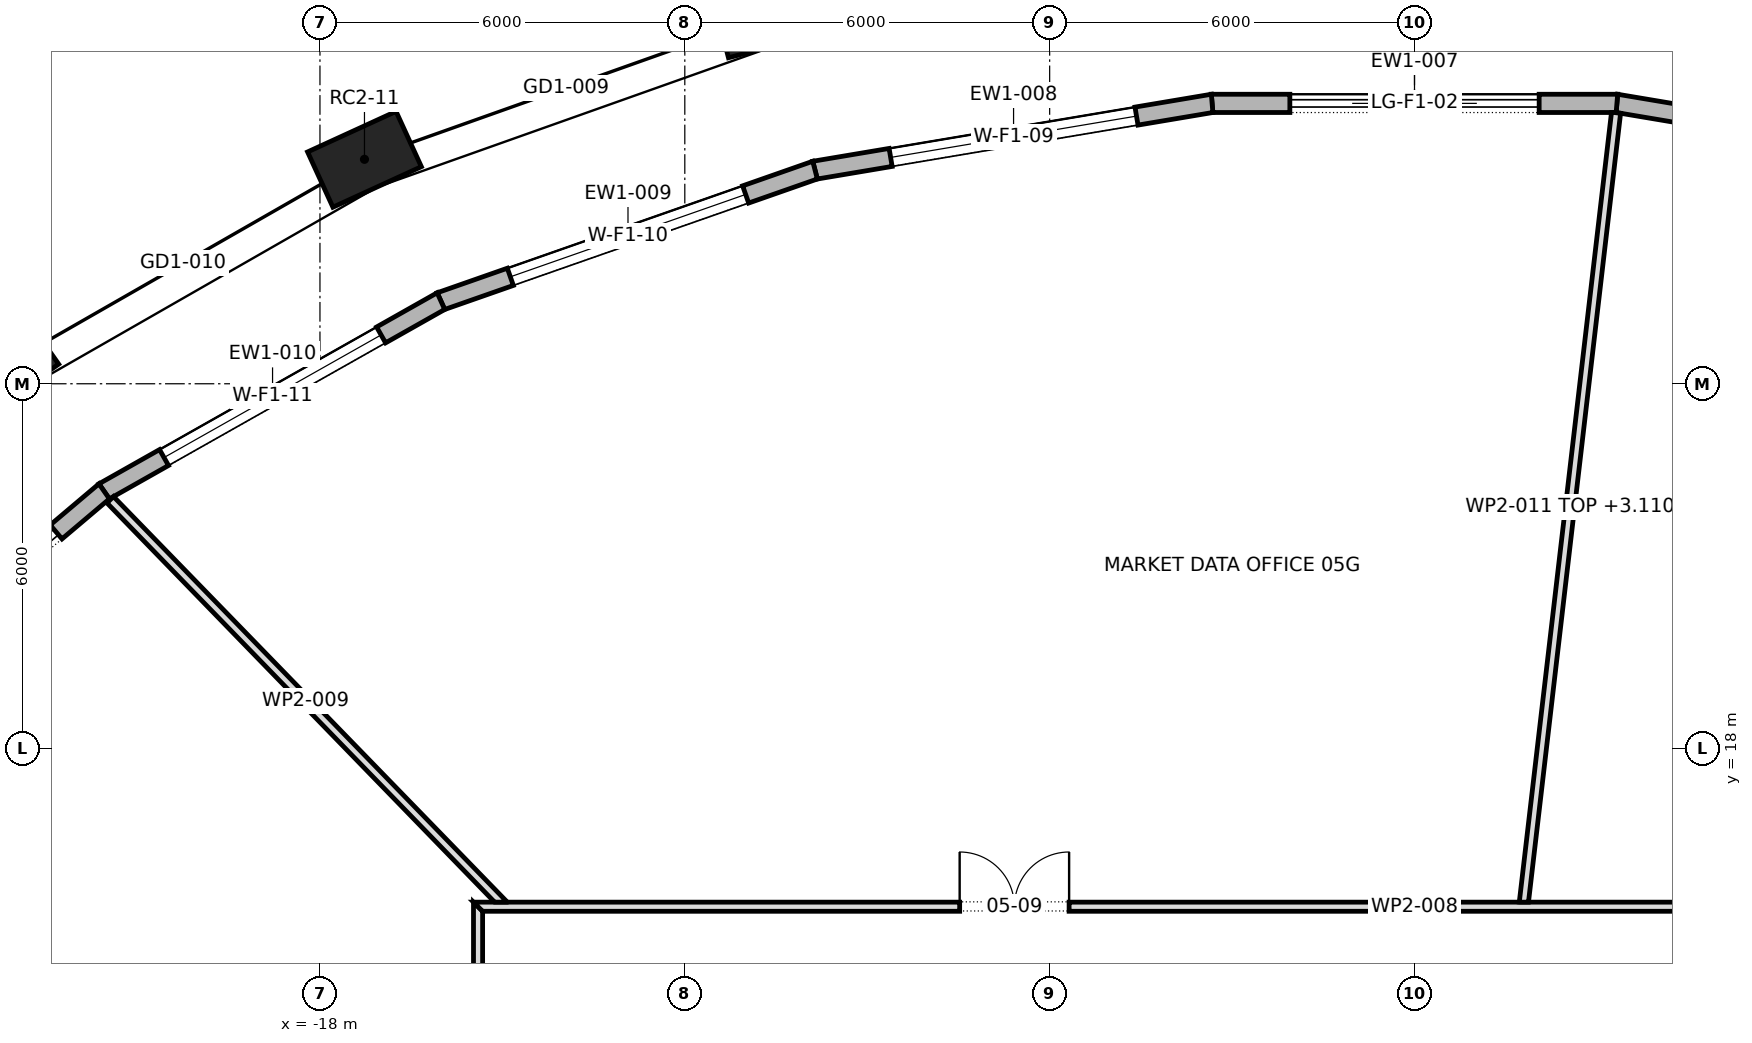
"""IFC4 building model, lengths in metres.
Left out: names, types, materials, properties, quantities, classifications, styles, units other than length and angle.
Written with IfcOpenShell. Run it as: python <this file> out.ifc"""

import sys

from ifc_helpers import new_model, si_unit, direction, frame, frame_2d, origin, origin_2d, place, context, subcontext, project, spatial, polyline, rectangle, outline, extrude, element, fill, save


model = new_model("IFC4")
c1 = context("Model", 3, precision=1e-05, world=origin(), true_north=direction((0.0, 1.0)))
c2 = subcontext(c1, "Body", "Model", "MODEL_VIEW")
j1 = project(units=[si_unit("LENGTHUNIT", "METRE"), si_unit("PLANEANGLEUNIT", "RADIAN")], contexts=[c1])
p1 = place(None, origin())
s1 = spatial("IfcSite", under=j1, at=p1, CompositionType="ELEMENT")
p2 = place(p1, origin())
s2 = spatial("IfcBuilding", under=s1, at=p2, CompositionType="ELEMENT")
p3 = place(p2, frame((0.0, 0.0, 73.9)))
s3 = spatial("IfcBuildingStorey", under=s2, at=p3, CompositionType="ELEMENT", Elevation=73.9)
for number, where, z_axis, x_axis in (
    (1, (-10.634, 30.046, 0.0), (0.0, 0.0, 1.0), (-0.968, -0.252, 0.0)),
    (2, (-17.268, 27.691, 0.0), (0.0, 0.0, 1.0), (-0.909, -0.417, 0.0)),
    (3, (-23.239, 24.271, 0.0), (0.0, 0.0, 1.0), (-0.818, -0.575, 0.0)),
):
    element("IfcColumn", number, at=place(p3, frame(where, z_axis=z_axis, x_axis=x_axis)), inside=s3, PredefinedType="COLUMN", context=c2, shape_type="SweptSolid", body=[
        extrude(rectangle(XDim=1.6, YDim=1.0, at=origin_2d()), origin(), (0.0, 0.0, 1.0), 4.2),
    ])
p4 = place(p3, frame((9.858, 27.513, 0.0), z_axis=(0.0, 0.0, 1.0), x_axis=(-0.986157735925, 0.165809890767, 0.0)))
e4 = element("IfcWall", 4, at=p4, inside=s3, PredefinedType="STANDARD", context=c2, shape_type="SweptSolid", body=[
    extrude(outline(polyline([(-0.013, -0.15), (6.634, -0.15), (6.609, 0.15), (0.013, 0.15), (-0.013, -0.15)])), origin(), (0.0, 0.0, 1.0), 3.9),
])
p5 = place(p4, frame((1.261, 0.0, 0.6)))
e5 = element("IfcOpeningElement", 5, at=p5, cuts=e4, PredefinedType="OPENING", context=c2, shape_type="SweptSolid", body=[
    extrude(rectangle(XDim=4.1, YDim=2.85, at=frame_2d((2.05, 1.425))), frame((0.0, 0.162, 0.0), z_axis=(0.0, -1.0, 0.0), x_axis=(1.0, 0.0, 0.0)), (0.0, 0.0, 1.0), 0.324),
])
p6 = place(p3, frame((3.329, 28.611, 0.0), z_axis=(0.0, 0.0, 1.0), x_axis=(-1.0, 0.0, 0.0)))
e6 = element("IfcWall", 6, at=p6, inside=s3, PredefinedType="STANDARD", context=c2, shape_type="SweptSolid", body=[
    extrude(outline(polyline([(-0.012, -0.15), (6.67, -0.15), (6.645, 0.15), (0.012, 0.15), (-0.012, -0.15)])), origin(), (0.0, 0.0, 1.0), 3.9),
])
p7 = place(p6, frame((1.279, 0.0, 0.0)))
e7 = element("IfcOpeningElement", 7, at=p7, cuts=e6, PredefinedType="OPENING", context=c2, shape_type="SweptSolid", body=[
    extrude(rectangle(XDim=4.1, YDim=3.45, at=frame_2d((2.05, 1.725))), frame((0.0, 0.162, 0.0), z_axis=(0.0, -1.0, 0.0), x_axis=(1.0, 0.0, 0.0)), (0.0, 0.0, 1.0), 0.324),
])
p8 = place(p3, frame((-3.329, 28.611, 0.0), z_axis=(0.0, 0.0, 1.0), x_axis=(-0.986157735925, -0.165809890767, 0.0)))
e8 = element("IfcWall", 8, at=p8, inside=s3, PredefinedType="STANDARD", context=c2, shape_type="SweptSolid", body=[
    extrude(outline(polyline([(-0.012, -0.15), (6.634, -0.15), (6.609, 0.15), (0.012, 0.15), (-0.012, -0.15)])), origin(), (0.0, 0.0, 1.0), 3.9),
])
p9 = place(p8, frame((1.261, 0.0, 0.6)))
e9 = element("IfcOpeningElement", 9, at=p9, cuts=e8, PredefinedType="OPENING", context=c2, shape_type="SweptSolid", body=[
    extrude(rectangle(XDim=4.1, YDim=2.85, at=frame_2d((2.05, 1.425))), frame((0.0, 0.162, 0.0), z_axis=(0.0, -1.0, 0.0), x_axis=(1.0, 0.0, 0.0)), (0.0, 0.0, 1.0), 0.324),
])
p10 = place(p3, frame((-9.858, 27.513, 0.0), z_axis=(0.0, 0.0, 1.0), x_axis=(-0.943815136299, -0.330473884736, 0.0)))
e10 = element("IfcWall", 10, at=p10, inside=s3, PredefinedType="STANDARD", context=c2, shape_type="SweptSolid", body=[
    extrude(outline(polyline([(-0.013, -0.15), (6.531, -0.15), (6.505, 0.15), (0.013, 0.15), (-0.013, -0.15)])), origin(), (0.0, 0.0, 1.0), 3.9),
])
p11 = place(p10, frame((1.209, 0.0, 0.6)))
e11 = element("IfcOpeningElement", 11, at=p11, cuts=e10, PredefinedType="OPENING", context=c2, shape_type="SweptSolid", body=[
    extrude(rectangle(XDim=4.1, YDim=2.85, at=frame_2d((2.05, 1.425))), frame((0.0, 0.162, 0.0), z_axis=(0.0, -1.0, 0.0), x_axis=(1.0, 0.0, 0.0)), (0.0, 0.0, 1.0), 0.324),
])
p12 = place(p3, frame((-16.01, 25.359, 0.0), z_axis=(0.0, 0.0, 1.0), x_axis=(-0.870710061474, -0.491796694629, 0.0)))
e12 = element("IfcWall", 12, at=p12, inside=s3, PredefinedType="STANDARD", context=c2, shape_type="SweptSolid", body=[
    extrude(outline(polyline([(-0.013, -0.15), (6.375, -0.15), (6.346, 0.15), (0.013, 0.15), (-0.013, -0.15)])), origin(), (0.0, 0.0, 1.0), 3.9),
])
p13 = place(p12, frame((1.13, 0.0, 0.6)))
e13 = element("IfcOpeningElement", 13, at=p13, cuts=e12, PredefinedType="OPENING", context=c2, shape_type="SweptSolid", body=[
    extrude(rectangle(XDim=4.1, YDim=2.85, at=frame_2d((2.05, 1.425))), frame((0.0, 0.162, 0.0), z_axis=(0.0, -1.0, 0.0), x_axis=(1.0, 0.0, 0.0)), (0.0, 0.0, 1.0), 0.324),
])
p14 = place(p3, frame((-21.549, 22.231, 0.0), z_axis=(0.0, 0.0, 1.0), x_axis=(-0.763693886759, -0.645578536916, 0.0)))
e14 = element("IfcWall", 14, at=p14, inside=s3, PredefinedType="STANDARD", context=c2, shape_type="SweptSolid", body=[
    extrude(outline(polyline([(-0.014, -0.15), (6.185, -0.15), (6.155, 0.15), (0.014, 0.15), (-0.014, -0.15)])), origin(), (0.0, 0.0, 1.0), 3.9),
])
p15 = place(p14, frame((1.035, 0.0, 0.0)))
e15 = element("IfcOpeningElement", 15, at=p15, cuts=e14, PredefinedType="OPENING", context=c2, shape_type="SweptSolid", body=[
    extrude(rectangle(XDim=4.1, YDim=3.45, at=frame_2d((2.05, 1.725))), frame((0.0, 0.162, 0.0), z_axis=(0.0, -1.0, 0.0), x_axis=(1.0, 0.0, 0.0)), (0.0, 0.0, 1.0), 0.324),
])
p16 = place(p3, frame((-15.4, -15.475, 0.0), z_axis=(0.0, 0.0, 1.0), x_axis=(0.0, 1.0, 0.0)))
e16 = element("IfcWall", 16, at=p16, inside=s3, PredefinedType="PARTITIONING", context=c2, shape_type="SweptSolid", body=[
    extrude(outline(polyline([(0.15, -0.075), (2.066, -0.075), (3.981, -0.075), (5.897, -0.075), (7.812, -0.075), (9.728, -0.075), (11.644, -0.075), (13.56, -0.075), (15.475, -0.075), (17.391, -0.075), (19.306, -0.075), (21.222, -0.075), (23.138, -0.075), (25.053, -0.075), (26.969, -0.075), (28.885, -0.075), (30.8, -0.075), (30.95, 0.075), (29.016, 0.075), (27.081, 0.075), (25.147, 0.075), (23.212, 0.075), (21.278, 0.075), (19.344, 0.075), (17.409, 0.075), (15.475, 0.075), (13.541, 0.075), (11.606, 0.075), (9.672, 0.075), (7.738, 0.075), (5.803, 0.075), (3.869, 0.075), (1.935, 0.075), (0.0, 0.075), (0.15, -0.075)])), origin(), (0.0, 0.0, 1.0), 3.9),
])
p17 = place(p16, frame((10.275, 0.0, 0.0)))
e17 = element("IfcOpeningElement", 17, at=p17, cuts=e16, PredefinedType="OPENING", context=c2, shape_type="SweptSolid", body=[
    extrude(rectangle(XDim=1.0, YDim=2.1, at=frame_2d((0.5, 1.05))), frame((0.0, 0.087, 0.0), z_axis=(0.0, -1.0, 0.0), x_axis=(1.0, 0.0, 0.0)), (0.0, 0.0, 1.0), 0.174),
])
p18 = place(p16, frame((22.915, 0.0, 0.0)))
e18 = element("IfcOpeningElement", 18, at=p18, cuts=e16, PredefinedType="OPENING", context=c2, shape_type="SweptSolid", body=[
    extrude(rectangle(XDim=1.8, YDim=2.1, at=frame_2d((0.9, 1.05))), frame((0.0, 0.087, 0.0), z_axis=(0.0, -1.0, 0.0), x_axis=(1.0, 0.0, 0.0)), (0.0, 0.0, 1.0), 0.174),
])
p19 = place(p3, frame((-15.475, 15.4, 0.0), z_axis=(0.0, 0.0, 1.0), x_axis=(1.0, 0.0, 0.0)))
e19 = element("IfcWall", 19, at=p19, inside=s3, PredefinedType="PARTITIONING", context=c2, shape_type="SweptSolid", body=[
    extrude(outline(polyline([(0.15, -0.075), (2.066, -0.075), (3.981, -0.075), (5.897, -0.075), (7.812, -0.075), (9.728, -0.075), (11.644, -0.075), (13.56, -0.075), (15.475, -0.075), (17.391, -0.075), (19.306, -0.075), (21.222, -0.075), (23.138, -0.075), (25.053, -0.075), (26.969, -0.075), (28.885, -0.075), (30.8, -0.075), (30.95, 0.075), (29.016, 0.075), (27.081, 0.075), (25.147, 0.075), (23.212, 0.075), (21.278, 0.075), (19.344, 0.075), (17.409, 0.075), (15.475, 0.075), (13.541, 0.075), (11.606, 0.075), (9.672, 0.075), (7.738, 0.075), (5.803, 0.075), (3.869, 0.075), (1.935, 0.075), (0.0, 0.075), (0.15, -0.075)])), origin(), (0.0, 0.0, 1.0), 3.9),
])
p20 = place(p19, frame((26.573, 0.0, 0.0)))
e20 = element("IfcOpeningElement", 20, at=p20, cuts=e19, PredefinedType="OPENING", context=c2, shape_type="SweptSolid", body=[
    extrude(rectangle(XDim=1.8, YDim=2.1, at=frame_2d((0.9, 1.05))), frame((0.0, 0.087, 0.0), z_axis=(0.0, -1.0, 0.0), x_axis=(1.0, 0.0, 0.0)), (0.0, 0.0, 1.0), 0.174),
])
p21 = place(p19, frame((19.768, 0.0, 0.0)))
e21 = element("IfcOpeningElement", 21, at=p21, cuts=e19, PredefinedType="OPENING", context=c2, shape_type="SweptSolid", body=[
    extrude(rectangle(XDim=1.8, YDim=2.1, at=frame_2d((0.9, 1.05))), frame((0.0, 0.087, 0.0), z_axis=(0.0, -1.0, 0.0), x_axis=(1.0, 0.0, 0.0)), (0.0, 0.0, 1.0), 0.174),
])
p22 = place(p19, frame((7.995, 0.0, 0.0)))
e22 = element("IfcOpeningElement", 22, at=p22, cuts=e19, PredefinedType="OPENING", context=c2, shape_type="SweptSolid", body=[
    extrude(rectangle(XDim=1.8, YDim=2.1, at=frame_2d((0.9, 1.05))), frame((0.0, 0.087, 0.0), z_axis=(0.0, -1.0, 0.0), x_axis=(1.0, 0.0, 0.0)), (0.0, 0.0, 1.0), 0.174),
])
p23 = place(p3, frame((-14.972, 15.423, 0.0), z_axis=(0.0, 0.0, 1.0), x_axis=(-0.696670635557, 0.717391124529, 0.0)))
e23 = element("IfcWall", 23, at=p23, inside=s3, PredefinedType="PARTITIONING", context=c2, shape_type="SweptSolid", body=[
    extrude(outline(polyline([(9.296, 0.075), (7.466, 0.075), (5.636, 0.075), (3.806, 0.075), (1.975, 0.075), (0.145, 0.075), (0.0, -0.074), (0.0, -0.075), (1.859, -0.075), (3.719, -0.075), (5.578, -0.075), (7.437, -0.075), (9.296, -0.075), (9.296, 0.075)])), origin(), (0.0, 0.0, 1.0), 3.9),
])
p24 = place(p3, frame((1.798, 15.467, 0.0), z_axis=(0.0, 0.0, 1.0), x_axis=(0.115980148961, 0.993251531611, 0.0)))
e24 = element("IfcWall", 24, at=p24, inside=s3, PredefinedType="PARTITIONING", context=c2, shape_type="SweptSolid", body=[
    extrude(outline(polyline([(13.079, -0.075), (13.079, 0.034), (13.074, 0.075), (11.206, 0.075), (9.338, 0.075), (7.471, 0.075), (5.603, 0.075), (3.735, 0.075), (1.868, 0.075), (0.0, 0.075), (0.0, 0.073), (0.017, -0.075), (1.883, -0.075), (3.749, -0.075), (5.615, -0.075), (7.481, -0.075), (9.347, -0.075), (11.213, -0.075), (13.079, -0.075)])), origin(), (0.0, 0.0, 1.0), 3.11),
])
p25 = place(p7, origin())
e25 = element("IfcDoor", 25, at=p25, inside=s3, OperationType="DOUBLE_DOOR_SLIDING", PredefinedType="DOOR", context=c2, shape_type="SweptSolid", body=[
    extrude(rectangle(XDim=4.1, YDim=3.45, at=frame_2d((2.05, 1.725))), frame((0.0, 0.025, 0.0), z_axis=(0.0, -1.0, 0.0), x_axis=(1.0, 0.0, 0.0)), (0.0, 0.0, 1.0), 0.05),
])
fill(e7, e25)
p26 = place(p9, origin())
e26 = element("IfcWindow", 26, at=p26, inside=s3, PartitioningType="TRIPLE_PANEL_VERTICAL", PredefinedType="WINDOW", context=c2, shape_type="SweptSolid", body=[
    extrude(rectangle(XDim=4.1, YDim=2.85, at=frame_2d((2.05, 1.425))), frame((0.0, 0.03, 0.0), z_axis=(0.0, -1.0, 0.0), x_axis=(1.0, 0.0, 0.0)), (0.0, 0.0, 1.0), 0.06),
])
fill(e9, e26)
p27 = place(p11, origin())
e27 = element("IfcWindow", 27, at=p27, inside=s3, PartitioningType="TRIPLE_PANEL_VERTICAL", PredefinedType="WINDOW", context=c2, shape_type="SweptSolid", body=[
    extrude(rectangle(XDim=4.1, YDim=2.85, at=frame_2d((2.05, 1.425))), frame((0.0, 0.03, 0.0), z_axis=(0.0, -1.0, 0.0), x_axis=(1.0, 0.0, 0.0)), (0.0, 0.0, 1.0), 0.06),
])
fill(e11, e27)
p28 = place(p13, origin())
e28 = element("IfcWindow", 28, at=p28, inside=s3, PartitioningType="TRIPLE_PANEL_VERTICAL", PredefinedType="WINDOW", context=c2, shape_type="SweptSolid", body=[
    extrude(rectangle(XDim=4.1, YDim=2.85, at=frame_2d((2.05, 1.425))), frame((0.0, 0.03, 0.0), z_axis=(0.0, -1.0, 0.0), x_axis=(1.0, 0.0, 0.0)), (0.0, 0.0, 1.0), 0.06),
])
fill(e13, e28)
p29 = place(p15, origin())
e29 = element("IfcDoor", 29, at=p29, inside=s3, OperationType="DOUBLE_DOOR_SLIDING", PredefinedType="DOOR", context=c2, shape_type="SweptSolid", body=[
    extrude(rectangle(XDim=4.1, YDim=3.45, at=frame_2d((2.05, 1.725))), frame((0.0, 0.025, 0.0), z_axis=(0.0, -1.0, 0.0), x_axis=(1.0, 0.0, 0.0)), (0.0, 0.0, 1.0), 0.05),
])
fill(e15, e29)
p30 = place(p22, origin())
e30 = element("IfcDoor", 30, at=p30, inside=s3, OperationType="DOUBLE_DOOR_SINGLE_SWING", PredefinedType="DOOR", context=c2, shape_type="SweptSolid", body=[
    extrude(rectangle(XDim=1.8, YDim=2.1, at=frame_2d((0.9, 1.05))), frame((0.0, 0.025, 0.0), z_axis=(0.0, -1.0, 0.0), x_axis=(1.0, 0.0, 0.0)), (0.0, 0.0, 1.0), 0.05),
])
fill(e22, e30)
save(model, sys.argv[1])
